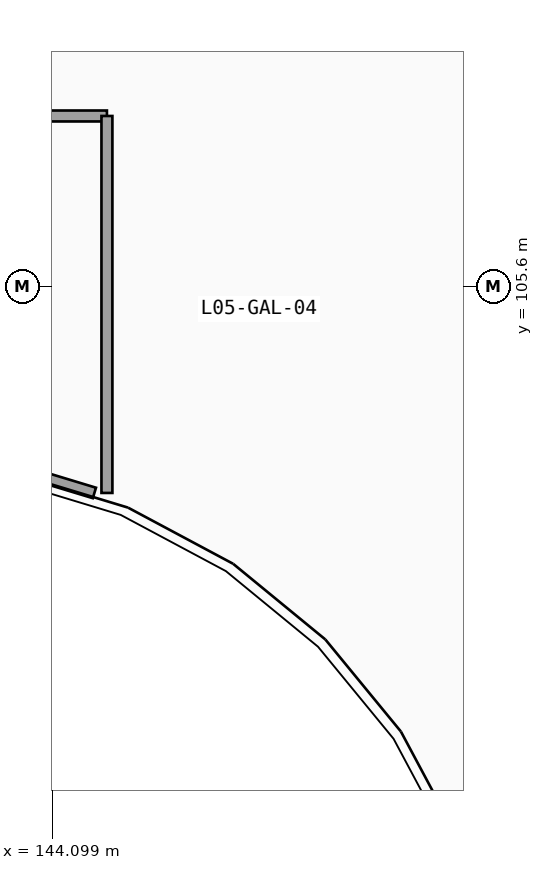
"""IFC4 building model, lengths in metres.
Left out: names, types, materials, properties, quantities, classifications, styles, units other than length and angle.
Written with IfcOpenShell. Run it as: python <this file> out.ifc"""

import sys

from ifc_helpers import new_model, si_unit, direction, frame, frame_2d, origin, place, context, subcontext, project, spatial, rectangle, extrude, element, save


model = new_model("IFC4")
c1 = context("Model", 3, precision=1e-05, world=origin(), true_north=direction((0.0, 1.0)))
c2 = subcontext(c1, "Body", "Model", "MODEL_VIEW")
j1 = project(units=[si_unit("LENGTHUNIT", "METRE"), si_unit("PLANEANGLEUNIT", "RADIAN")], contexts=[c1])
p1 = place(None, origin())
s1 = spatial("IfcSite", under=j1, at=p1, CompositionType="ELEMENT")
p2 = place(p1, origin())
s2 = spatial("IfcBuilding", under=s1, at=p2, CompositionType="ELEMENT")
p3 = place(p2, frame((0.0, 0.0, 23.1)))
s3 = spatial("IfcBuildingStorey", under=s2, at=p3, CompositionType="ELEMENT", Elevation=23.1)
p4 = place(p3, frame((140.38, 108.4, 0.0), z_axis=(0.0, 0.0, 1.0), x_axis=(1.0, 0.0, 0.0)))
e1 = element("IfcWall", 1, at=p4, inside=s3, PredefinedType="PARTITIONING", context=c2, shape_type="SweptSolid", body=[
    extrude(rectangle(XDim=4.62, YDim=0.18, at=frame_2d((2.31, 0.0))), origin(), (0.0, 0.0, 1.0), 4.82),
])
p5 = place(p3, frame((145.0, 108.4, 0.0), z_axis=(0.0, 0.0, 1.0), x_axis=(0.0, -1.0, 0.0)))
e2 = element("IfcWall", 2, at=p5, inside=s3, PredefinedType="PARTITIONING", context=c2, shape_type="SweptSolid", body=[
    extrude(rectangle(XDim=6.2, YDim=0.18, at=frame_2d((3.1, 0.0))), origin(), (0.0, 0.0, 1.0), 4.82),
])
p6 = place(p3, frame((144.794, 102.2, 0.0), z_axis=(0.0, 0.0, 1.0), x_axis=(-0.956921766266, 0.290345885534, 0.0)))
e3 = element("IfcWall", 3, at=p6, inside=s3, PredefinedType="PARTITIONING", context=c2, shape_type="SweptSolid", body=[
    extrude(rectangle(XDim=1.441, YDim=0.18, at=frame_2d((0.721, 0.0))), origin(), (0.0, 0.0, 1.0), 4.82),
])
save(model, sys.argv[1])
